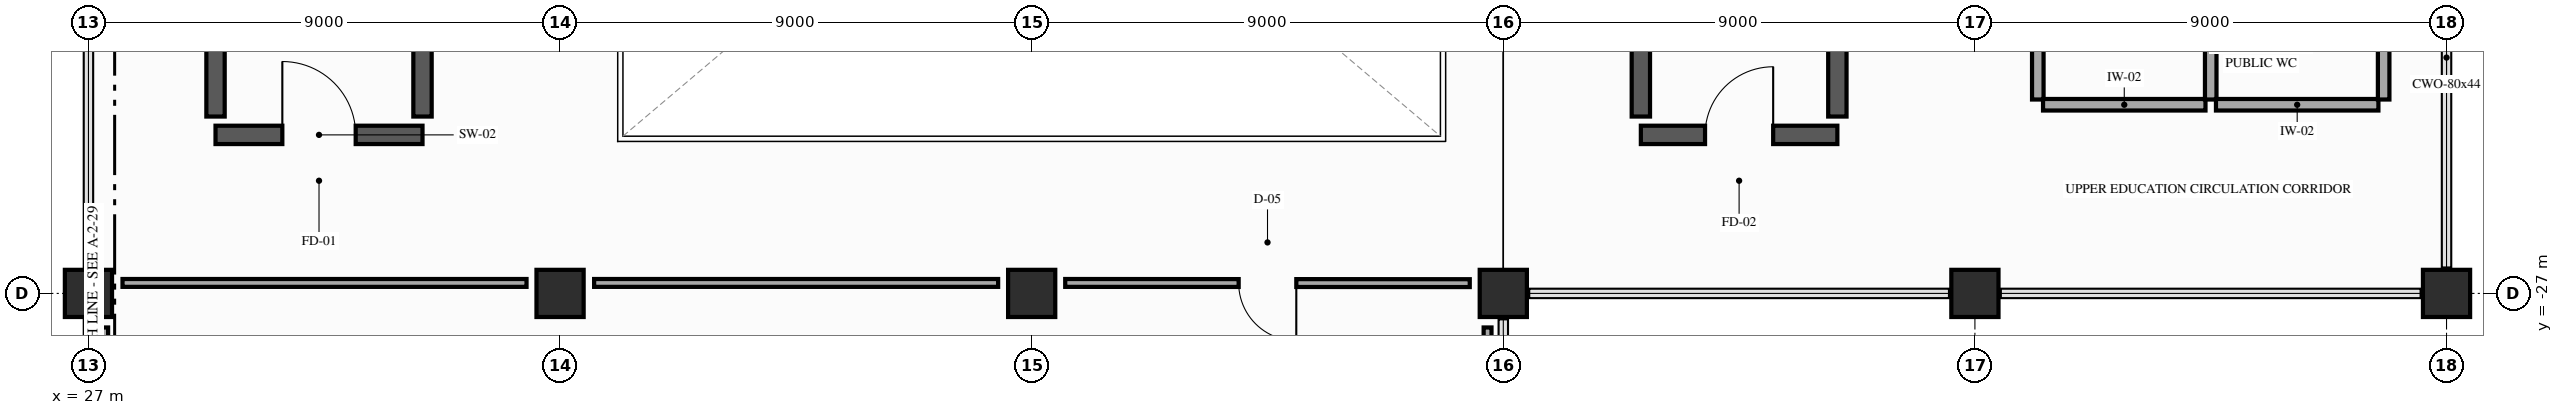
"""IFC4 building model, lengths in metres.
Left out: names, types, materials, properties, quantities, classifications, styles, units other than length and angle.
Written with IfcOpenShell. Run it as: python <this file> out.ifc"""

import sys

from ifc_helpers import new_model, si_unit, direction, frame, frame_2d, origin, origin_2d, place, context, subcontext, project, spatial, rectangle, extrude, element, fill, save


model = new_model("IFC4")
c1 = context("Model", 3, precision=1e-05, world=origin(), true_north=direction((0.0, 1.0)))
c2 = subcontext(c1, "Body", "Model", "MODEL_VIEW")
j1 = project(units=[si_unit("LENGTHUNIT", "METRE"), si_unit("PLANEANGLEUNIT", "RADIAN")], contexts=[c1])
p1 = place(None, origin())
s1 = spatial("IfcSite", under=j1, at=p1, CompositionType="ELEMENT")
p2 = place(p1, origin())
s2 = spatial("IfcBuilding", under=s1, at=p2, CompositionType="ELEMENT")
p3 = place(p2, frame((0.0, 0.0, 10.8)))
s3 = spatial("IfcBuildingStorey", under=s2, at=p3, CompositionType="ELEMENT", Elevation=10.8)
for number, where, z_axis, x_axis in (
    (1, (27.0, -27.0, 0.0), (0.0, 0.0, 1.0), (1.0, 0.0, 0.0)),
    (2, (36.0, -27.0, 0.0), (0.0, 0.0, 1.0), (1.0, 0.0, 0.0)),
    (3, (45.0, -27.0, 0.0), (0.0, 0.0, 1.0), (1.0, 0.0, 0.0)),
    (4, (54.0, -27.0, 0.0), (0.0, 0.0, 1.0), (1.0, 0.0, 0.0)),
    (5, (63.0, -27.0, 0.0), (0.0, 0.0, 1.0), (1.0, 0.0, 0.0)),
    (6, (72.0, -27.0, 0.0), (0.0, 0.0, 1.0), (1.0, 0.0, 0.0)),
):
    element("IfcColumn", number, at=place(p3, frame(where, z_axis=z_axis, x_axis=x_axis)), inside=s3, PredefinedType="COLUMN", context=c2, shape_type="SweptSolid", body=[
        extrude(rectangle(XDim=0.9, YDim=0.9, at=origin_2d()), origin(), (0.0, 0.0, 1.0), 5.4),
    ])
p4 = place(p3, frame((29.425, -23.975, 0.0), z_axis=(0.0, 0.0, 1.0), x_axis=(1.0, 0.0, 0.0)))
e7 = element("IfcWall", 7, at=p4, inside=s3, PredefinedType="SHEAR", context=c2, shape_type="SweptSolid", body=[
    extrude(rectangle(XDim=3.95, YDim=0.35, at=frame_2d((1.975, 0.0))), origin(), (0.0, 0.0, 1.0), 5.16),
])
p5 = place(p4, frame((1.275, 0.0, 0.0)))
e8 = element("IfcOpeningElement", 8, at=p5, cuts=e7, PredefinedType="OPENING", context=c2, shape_type="SweptSolid", body=[
    extrude(rectangle(XDim=1.4, YDim=2.2, at=frame_2d((0.7, 1.1))), frame((0.0, 0.185, 0.0), z_axis=(0.0, -1.0, 0.0), x_axis=(1.0, 0.0, 0.0)), (0.0, 0.0, 1.0), 0.37),
])
for number, where, z_axis, x_axis in (
    (9, (29.425, -23.625, 0.0), (0.0, 0.0, 1.0), (0.0, 1.0, 0.0)),
    (10, (33.375, -23.625, 0.0), (0.0, 0.0, 1.0), (0.0, 1.0, 0.0)),
):
    element("IfcWall", number, at=place(p3, frame(where, z_axis=z_axis, x_axis=x_axis)), inside=s3, PredefinedType="SHEAR", context=c2, shape_type="SweptSolid", body=[
        extrude(rectangle(XDim=9.1, YDim=0.35, at=frame_2d((4.55, 0.0))), origin(), (0.0, 0.0, 1.0), 5.16),
    ])
p6 = place(p3, frame((56.625, -23.975, 0.0), z_axis=(0.0, 0.0, 1.0), x_axis=(1.0, 0.0, 0.0)))
e11 = element("IfcWall", 11, at=p6, inside=s3, PredefinedType="SHEAR", context=c2, shape_type="SweptSolid", body=[
    extrude(rectangle(XDim=3.75, YDim=0.35, at=frame_2d((1.875, 0.0))), origin(), (0.0, 0.0, 1.0), 5.16),
])
p7 = place(p6, frame((1.225, 0.0, 0.0)))
e12 = element("IfcOpeningElement", 12, at=p7, cuts=e11, PredefinedType="OPENING", context=c2, shape_type="SweptSolid", body=[
    extrude(rectangle(XDim=1.3, YDim=2.2, at=frame_2d((0.65, 1.1))), frame((0.0, 0.185, 0.0), z_axis=(0.0, -1.0, 0.0), x_axis=(1.0, 0.0, 0.0)), (0.0, 0.0, 1.0), 0.37),
])
for number, where, z_axis, x_axis in (
    (13, (56.625, -23.625, 0.0), (0.0, 0.0, 1.0), (0.0, 1.0, 0.0)),
    (14, (60.375, -23.625, 0.0), (0.0, 0.0, 1.0), (0.0, 1.0, 0.0)),
):
    element("IfcWall", number, at=place(p3, frame(where, z_axis=z_axis, x_axis=x_axis)), inside=s3, PredefinedType="SHEAR", context=c2, shape_type="SweptSolid", body=[
        extrude(rectangle(XDim=9.1, YDim=0.35, at=frame_2d((4.55, 0.0))), origin(), (0.0, 0.0, 1.0), 5.16),
    ])
p8 = place(p3, frame((64.2, -19.1, 0.0), z_axis=(0.0, 0.0, 1.0), x_axis=(0.0, -1.0, 0.0)))
e15 = element("IfcWall", 15, at=p8, inside=s3, PredefinedType="PLUMBINGWALL", context=c2, shape_type="SweptSolid", body=[
    extrude(rectangle(XDim=4.2, YDim=0.22, at=frame_2d((2.1, 0.0))), origin(), (0.0, 0.0, 1.0), 4.645),
])
p9 = place(p8, frame((1.575, 0.0, 0.0)))
e16 = element("IfcOpeningElement", 16, at=p9, cuts=e15, PredefinedType="OPENING", context=c2, shape_type="SweptSolid", body=[
    extrude(rectangle(XDim=1.05, YDim=2.15, at=frame_2d((0.525, 1.075))), frame((0.0, 0.12, 0.0), z_axis=(0.0, -1.0, 0.0), x_axis=(1.0, 0.0, 0.0)), (0.0, 0.0, 1.0), 0.24),
])
p10 = place(p3, frame((64.3, -23.4, 0.0), z_axis=(0.0, 0.0, 1.0), x_axis=(1.0, 0.0, 0.0)))
e17 = element("IfcWall", 17, at=p10, inside=s3, PredefinedType="PLUMBINGWALL", context=c2, shape_type="SweptSolid", body=[
    extrude(rectangle(XDim=3.1, YDim=0.22, at=frame_2d((1.55, 0.0))), origin(), (0.0, 0.0, 1.0), 5.05),
])
p11 = place(p3, frame((67.5, -23.3, 0.0), z_axis=(0.0, 0.0, 1.0), x_axis=(0.0, 1.0, 0.0)))
e18 = element("IfcWall", 18, at=p11, inside=s3, PredefinedType="PLUMBINGWALL", context=c2, shape_type="SweptSolid", body=[
    extrude(rectangle(XDim=4.2, YDim=0.22, at=frame_2d((2.1, 0.0))), origin(), (0.0, 0.0, 1.0), 4.645),
])
p12 = place(p3, frame((67.6, -23.4, 0.0), z_axis=(0.0, 0.0, 1.0), x_axis=(1.0, 0.0, 0.0)))
e19 = element("IfcWall", 19, at=p12, inside=s3, PredefinedType="PLUMBINGWALL", context=c2, shape_type="SweptSolid", body=[
    extrude(rectangle(XDim=3.1, YDim=0.22, at=frame_2d((1.55, 0.0))), origin(), (0.0, 0.0, 1.0), 5.05),
])
p13 = place(p3, frame((70.8, -23.3, 0.0), z_axis=(0.0, 0.0, 1.0), x_axis=(0.0, 1.0, 0.0)))
e20 = element("IfcWall", 20, at=p13, inside=s3, PredefinedType="PLUMBINGWALL", context=c2, shape_type="SweptSolid", body=[
    extrude(rectangle(XDim=4.2, YDim=0.22, at=frame_2d((2.1, 0.0))), origin(), (0.0, 0.0, 1.0), 4.645),
])
p14 = place(p13, frame((1.625, 0.0, 0.0)))
e21 = element("IfcOpeningElement", 21, at=p14, cuts=e20, PredefinedType="OPENING", context=c2, shape_type="SweptSolid", body=[
    extrude(rectangle(XDim=0.95, YDim=2.15, at=frame_2d((0.475, 1.075))), frame((0.0, 0.12, 0.0), z_axis=(0.0, -1.0, 0.0), x_axis=(1.0, 0.0, 0.0)), (0.0, 0.0, 1.0), 0.24),
])
p15 = place(p3, frame((27.3, -27.65, 0.0), z_axis=(0.0, 0.0, 1.0), x_axis=(0.0, -1.0, 0.0)))
e22 = element("IfcWall", 22, at=p15, inside=s3, PredefinedType="PARTITIONING", context=c2, shape_type="SweptSolid", body=[
    extrude(rectangle(XDim=7.7, YDim=0.15, at=frame_2d((3.85, 0.0))), origin(), (0.0, 0.0, 1.0), 4.445),
])
p16 = place(p3, frame((53.696, -35.36, 0.0), z_axis=(0.0, 0.0, 1.0), x_axis=(0.00050663367, 0.999999871661, 0.0)))
e23 = element("IfcWall", 23, at=p16, inside=s3, PredefinedType="PARTITIONING", context=c2, shape_type="SweptSolid", body=[
    extrude(rectangle(XDim=7.71, YDim=0.15, at=frame_2d((3.855, 0.0))), origin(), (0.0, 0.0, 1.0), 4.445),
])
p17 = place(p3, frame((53.36, -26.804, 0.0), z_axis=(0.0, 0.0, 1.0), x_axis=(-0.999999871994, 0.000505976787, 0.0)))
e24 = element("IfcWall", 24, at=p17, inside=s3, PredefinedType="PARTITIONING", context=c2, shape_type="SweptSolid", body=[
    extrude(rectangle(XDim=7.72, YDim=0.15, at=frame_2d((3.86, 0.0))), origin(), (0.0, 0.0, 1.0), 4.395),
])
p18 = place(p17, frame((3.31, 0.0, 0.0)))
e25 = element("IfcOpeningElement", 25, at=p18, cuts=e24, PredefinedType="OPENING", context=c2, shape_type="SweptSolid", body=[
    extrude(rectangle(XDim=1.1, YDim=2.15, at=frame_2d((0.55, 1.075))), frame((0.0, 0.085, 0.0), z_axis=(0.0, -1.0, 0.0), x_axis=(1.0, 0.0, 0.0)), (0.0, 0.0, 1.0), 0.17),
])
for number, where, z_axis, x_axis in (
    (26, (44.36, -26.8, 0.0), (0.0, 0.0, 1.0), (-1.0, 0.0, 0.0)),
    (27, (35.36, -26.8, 0.0), (0.0, 0.0, 1.0), (-1.0, 0.0, 0.0)),
):
    element("IfcWall", number, at=place(p3, frame(where, z_axis=z_axis, x_axis=x_axis)), inside=s3, PredefinedType="PARTITIONING", context=c2, shape_type="SweptSolid", body=[
        extrude(rectangle(XDim=7.71, YDim=0.15, at=frame_2d((3.855, 0.0))), origin(), (0.0, 0.0, 1.0), 4.395),
    ])
p19 = place(p5, origin())
e28 = element("IfcDoor", 28, at=p19, inside=s3, OperationType="SINGLE_SWING_LEFT", PredefinedType="DOOR", context=c2, shape_type="SweptSolid", body=[
    extrude(rectangle(XDim=1.4, YDim=2.2, at=frame_2d((0.7, 1.1))), frame((0.0, 0.025, 0.0), z_axis=(0.0, -1.0, 0.0), x_axis=(1.0, 0.0, 0.0)), (0.0, 0.0, 1.0), 0.05),
])
fill(e8, e28)
p20 = place(p7, origin())
e29 = element("IfcDoor", 29, at=p20, inside=s3, OperationType="SINGLE_SWING_RIGHT", PredefinedType="DOOR", context=c2, shape_type="SweptSolid", body=[
    extrude(rectangle(XDim=1.3, YDim=2.2, at=frame_2d((0.65, 1.1))), frame((0.0, 0.025, 0.0), z_axis=(0.0, -1.0, 0.0), x_axis=(1.0, 0.0, 0.0)), (0.0, 0.0, 1.0), 0.05),
])
fill(e12, e29)
p21 = place(p18, origin())
e30 = element("IfcDoor", 30, at=p21, inside=s3, OperationType="SINGLE_SWING_LEFT", PredefinedType="DOOR", context=c2, shape_type="SweptSolid", body=[
    extrude(rectangle(XDim=1.1, YDim=2.15, at=frame_2d((0.55, 1.075))), frame((0.0, 0.025, 0.0), z_axis=(0.0, -1.0, 0.0), x_axis=(1.0, 0.0, 0.0)), (0.0, 0.0, 1.0), 0.05),
])
fill(e25, e30)
save(model, sys.argv[1])
